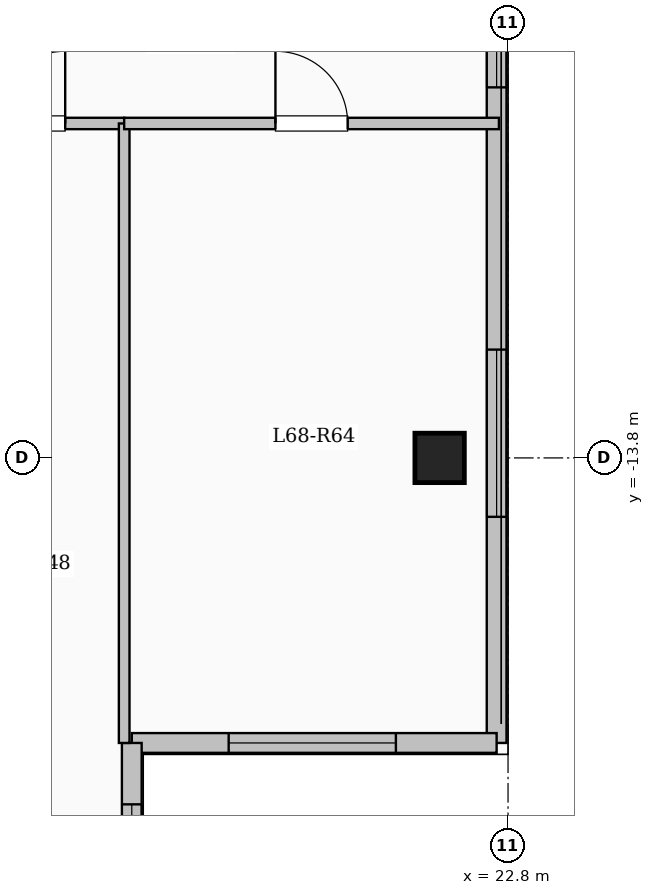
"""IFC4 building model, lengths in metres.
Left out: names, types, materials, properties, quantities, classifications, styles, units other than length and angle.
Written with IfcOpenShell. Run it as: python <this file> out.ifc"""

import sys

from ifc_helpers import new_model, si_unit, direction, frame, frame_2d, origin, origin_2d, place, context, subcontext, project, spatial, rectangle, extrude, element, fill, save


model = new_model("IFC4")
c1 = context("Model", 3, precision=1e-05, world=origin(), true_north=direction((0.0, 1.0)))
c2 = subcontext(c1, "Body", "Model", "MODEL_VIEW")
j1 = project(units=[si_unit("LENGTHUNIT", "METRE"), si_unit("PLANEANGLEUNIT", "RADIAN")], contexts=[c1])
p1 = place(None, origin())
s1 = spatial("IfcSite", under=j1, at=p1, CompositionType="ELEMENT")
p2 = place(p1, origin())
s2 = spatial("IfcBuilding", under=s1, at=p2, CompositionType="ELEMENT")
p3 = place(p2, frame((0.0, 0.0, 251.55)))
s3 = spatial("IfcBuildingStorey", under=s2, at=p3, CompositionType="ELEMENT", Elevation=251.55)
p4 = place(p3, frame((21.9, -13.8, 0.0), z_axis=(0.0, 0.0, 1.0), x_axis=(1.0, 0.0, 0.0)))
e1 = element("IfcColumn", 1, at=p4, inside=s3, PredefinedType="COLUMN", context=c2, shape_type="SweptSolid", body=[
    extrude(rectangle(XDim=0.65, YDim=0.65, at=origin_2d()), origin(), (0.0, 0.0, 1.0), 3.35),
])
p5 = place(p3, frame((22.65, 17.55, 0.0), z_axis=(0.0, 0.0, 1.0), x_axis=(0.0, -1.0, 0.0)))
e2 = element("IfcWall", 2, at=p5, inside=s3, PredefinedType="SOLIDWALL", context=c2, shape_type="SweptSolid", body=[
    extrude(rectangle(XDim=35.1, YDim=0.26, at=frame_2d((17.55, 0.0))), origin(), (0.0, 0.0, 1.0), 3.1),
])
p6 = place(p5, frame((1.525, 0.0, 0.9)))
e3 = element("IfcOpeningElement", 3, at=p6, cuts=e2, PredefinedType="OPENING", context=c2, shape_type="SweptSolid", body=[
    extrude(rectangle(XDim=2.0, YDim=1.7, at=frame_2d((1.0, 0.85))), frame((0.0, 0.14, 0.0), z_axis=(0.0, -1.0, 0.0), x_axis=(1.0, 0.0, 0.0)), (0.0, 0.0, 1.0), 0.28),
])
p7 = place(p5, frame((5.425, 0.0, 0.95)))
e4 = element("IfcOpeningElement", 4, at=p7, cuts=e2, PredefinedType="OPENING", context=c2, shape_type="SweptSolid", body=[
    extrude(rectangle(XDim=1.0, YDim=1.5, at=frame_2d((0.5, 0.75))), frame((0.0, 0.14, 0.0), z_axis=(0.0, -1.0, 0.0), x_axis=(1.0, 0.0, 0.0)), (0.0, 0.0, 1.0), 0.28),
])
p8 = place(p5, frame((14.8, 0.0, 0.9)))
e5 = element("IfcOpeningElement", 5, at=p8, cuts=e2, PredefinedType="OPENING", context=c2, shape_type="SweptSolid", body=[
    extrude(rectangle(XDim=2.0, YDim=1.7, at=frame_2d((1.0, 0.85))), frame((0.0, 0.14, 0.0), z_axis=(0.0, -1.0, 0.0), x_axis=(1.0, 0.0, 0.0)), (0.0, 0.0, 1.0), 0.28),
])
p9 = place(p5, frame((25.275, 0.0, 0.95)))
e6 = element("IfcOpeningElement", 6, at=p9, cuts=e2, PredefinedType="OPENING", context=c2, shape_type="SweptSolid", body=[
    extrude(rectangle(XDim=1.2, YDim=1.5, at=frame_2d((0.6, 0.75))), frame((0.0, 0.14, 0.0), z_axis=(0.0, -1.0, 0.0), x_axis=(1.0, 0.0, 0.0)), (0.0, 0.0, 1.0), 0.28),
])
p10 = place(p5, frame((29.925, 0.0, 0.9)))
e7 = element("IfcOpeningElement", 7, at=p10, cuts=e2, PredefinedType="OPENING", context=c2, shape_type="SweptSolid", body=[
    extrude(rectangle(XDim=2.2, YDim=1.75, at=frame_2d((1.1, 0.875))), frame((0.0, 0.14, 0.0), z_axis=(0.0, -1.0, 0.0), x_axis=(1.0, 0.0, 0.0)), (0.0, 0.0, 1.0), 0.28),
])
p11 = place(p3, frame((22.65, -17.55, 0.0), z_axis=(0.0, 0.0, 1.0), x_axis=(-1.0, 0.0, 0.0)))
e8 = element("IfcWall", 8, at=p11, inside=s3, PredefinedType="SOLIDWALL", context=c2, shape_type="SweptSolid", body=[
    extrude(rectangle(XDim=4.8, YDim=0.26, at=frame_2d((2.4, 0.0))), origin(), (0.0, 0.0, 1.0), 3.1),
])
p12 = place(p11, frame((1.325, 0.0, 0.9)))
e9 = element("IfcOpeningElement", 9, at=p12, cuts=e8, PredefinedType="OPENING", context=c2, shape_type="SweptSolid", body=[
    extrude(rectangle(XDim=2.2, YDim=1.75, at=frame_2d((1.1, 0.875))), frame((0.0, 0.14, 0.0), z_axis=(0.0, -1.0, 0.0), x_axis=(1.0, 0.0, 0.0)), (0.0, 0.0, 1.0), 0.28),
])
p13 = place(p3, frame((17.85, -17.55, 0.0), z_axis=(0.0, 0.0, 1.0), x_axis=(0.0, -1.0, 0.0)))
e10 = element("IfcWall", 10, at=p13, inside=s3, PredefinedType="SOLIDWALL", context=c2, shape_type="SweptSolid", body=[
    extrude(rectangle(XDim=3.3, YDim=0.26, at=frame_2d((1.65, 0.0))), origin(), (0.0, 0.0, 1.0), 3.1),
])
p14 = place(p13, frame((0.808, 0.0, 0.9)))
e11 = element("IfcOpeningElement", 11, at=p14, cuts=e10, PredefinedType="OPENING", context=c2, shape_type="SweptSolid", body=[
    extrude(rectangle(XDim=1.65, YDim=1.6, at=frame_2d((0.825, 0.8))), frame((0.0, 0.14, 0.0), z_axis=(0.0, -1.0, 0.0), x_axis=(1.0, 0.0, 0.0)), (0.0, 0.0, 1.0), 0.28),
])
p15 = place(p3, frame((8.55, -9.4, 0.0), z_axis=(0.0, 0.0, 1.0), x_axis=(1.0, 0.0, 0.0)))
e12 = element("IfcWall", 12, at=p15, inside=s3, PredefinedType="PARTITIONING", context=c2, shape_type="SweptSolid", body=[
    extrude(rectangle(XDim=9.2, YDim=0.15, at=frame_2d((4.6, 0.0))), origin(), (0.0, 0.0, 1.0), 3.1),
])
p16 = place(p15, frame((1.192, 0.0, 0.0)))
e13 = element("IfcOpeningElement", 13, at=p16, cuts=e12, PredefinedType="OPENING", context=c2, shape_type="SweptSolid", body=[
    extrude(rectangle(XDim=0.95, YDim=2.15, at=frame_2d((0.475, 1.075))), frame((0.0, 0.085, 0.0), z_axis=(0.0, -1.0, 0.0), x_axis=(1.0, 0.0, 0.0)), (0.0, 0.0, 1.0), 0.17),
])
p17 = place(p15, frame((4.516, 0.0, 0.0)))
e14 = element("IfcOpeningElement", 14, at=p17, cuts=e12, PredefinedType="OPENING", context=c2, shape_type="SweptSolid", body=[
    extrude(rectangle(XDim=0.95, YDim=2.15, at=frame_2d((0.475, 1.075))), frame((0.0, 0.085, 0.0), z_axis=(0.0, -1.0, 0.0), x_axis=(1.0, 0.0, 0.0)), (0.0, 0.0, 1.0), 0.17),
])
p18 = place(p15, frame((7.474, 0.0, 0.0)))
e15 = element("IfcOpeningElement", 15, at=p18, cuts=e12, PredefinedType="OPENING", context=c2, shape_type="SweptSolid", body=[
    extrude(rectangle(XDim=0.95, YDim=2.15, at=frame_2d((0.475, 1.075))), frame((0.0, 0.085, 0.0), z_axis=(0.0, -1.0, 0.0), x_axis=(1.0, 0.0, 0.0)), (0.0, 0.0, 1.0), 0.17),
])
p19 = place(p3, frame((17.75, -17.55, 0.0), z_axis=(0.0, 0.0, 1.0), x_axis=(0.0, 1.0, 0.0)))
e16 = element("IfcWall", 16, at=p19, inside=s3, PredefinedType="PARTITIONING", context=c2, shape_type="SweptSolid", body=[
    extrude(rectangle(XDim=8.15, YDim=0.14, at=frame_2d((4.075, 0.0))), origin(), (0.0, 0.0, 1.0), 3.1),
])
p20 = place(p3, frame((17.75, -9.4, 0.0), z_axis=(0.0, 0.0, 1.0), x_axis=(1.0, 0.0, 0.0)))
e17 = element("IfcWall", 17, at=p20, inside=s3, PredefinedType="PARTITIONING", context=c2, shape_type="SweptSolid", body=[
    extrude(rectangle(XDim=4.93, YDim=0.15, at=frame_2d((2.465, 0.0))), origin(), (0.0, 0.0, 1.0), 3.1),
])
p21 = place(p20, frame((1.99, 0.0, 0.0)))
e18 = element("IfcOpeningElement", 18, at=p21, cuts=e17, PredefinedType="OPENING", context=c2, shape_type="SweptSolid", body=[
    extrude(rectangle(XDim=0.95, YDim=2.15, at=frame_2d((0.475, 1.075))), frame((0.0, 0.085, 0.0), z_axis=(0.0, -1.0, 0.0), x_axis=(1.0, 0.0, 0.0)), (0.0, 0.0, 1.0), 0.17),
])
p22 = place(p9, origin())
e19 = element("IfcWindow", 19, at=p22, inside=s3, PartitioningType="SINGLE_PANEL", PredefinedType="WINDOW", context=c2, shape_type="SweptSolid", body=[
    extrude(rectangle(XDim=1.2, YDim=1.5, at=frame_2d((0.6, 0.75))), frame((0.0, 0.03, 0.0), z_axis=(0.0, -1.0, 0.0), x_axis=(1.0, 0.0, 0.0)), (0.0, 0.0, 1.0), 0.06),
])
fill(e6, e19)
p23 = place(p10, origin())
e20 = element("IfcWindow", 20, at=p23, inside=s3, PartitioningType="SINGLE_PANEL", PredefinedType="WINDOW", context=c2, shape_type="SweptSolid", body=[
    extrude(rectangle(XDim=2.2, YDim=1.75, at=frame_2d((1.1, 0.875))), frame((0.0, 0.03, 0.0), z_axis=(0.0, -1.0, 0.0), x_axis=(1.0, 0.0, 0.0)), (0.0, 0.0, 1.0), 0.06),
])
fill(e7, e20)
p24 = place(p12, origin())
e21 = element("IfcWindow", 21, at=p24, inside=s3, PartitioningType="SINGLE_PANEL", PredefinedType="WINDOW", context=c2, shape_type="SweptSolid", body=[
    extrude(rectangle(XDim=2.2, YDim=1.75, at=frame_2d((1.1, 0.875))), frame((0.0, 0.03, 0.0), z_axis=(0.0, -1.0, 0.0), x_axis=(1.0, 0.0, 0.0)), (0.0, 0.0, 1.0), 0.06),
])
fill(e9, e21)
p25 = place(p14, origin())
e22 = element("IfcWindow", 22, at=p25, inside=s3, PartitioningType="SINGLE_PANEL", PredefinedType="WINDOW", context=c2, shape_type="SweptSolid", body=[
    extrude(rectangle(XDim=1.65, YDim=1.6, at=frame_2d((0.825, 0.8))), frame((0.0, 0.03, 0.0), z_axis=(0.0, -1.0, 0.0), x_axis=(1.0, 0.0, 0.0)), (0.0, 0.0, 1.0), 0.06),
])
fill(e11, e22)
p26 = place(p18, origin())
e23 = element("IfcDoor", 23, at=p26, inside=s3, OperationType="SINGLE_SWING_RIGHT", PredefinedType="DOOR", context=c2, shape_type="SweptSolid", body=[
    extrude(rectangle(XDim=0.95, YDim=2.15, at=frame_2d((0.475, 1.075))), frame((0.0, 0.025, 0.0), z_axis=(0.0, -1.0, 0.0), x_axis=(1.0, 0.0, 0.0)), (0.0, 0.0, 1.0), 0.05),
])
fill(e15, e23)
p27 = place(p21, origin())
e24 = element("IfcDoor", 24, at=p27, inside=s3, OperationType="SINGLE_SWING_LEFT", PredefinedType="DOOR", context=c2, shape_type="SweptSolid", body=[
    extrude(rectangle(XDim=0.95, YDim=2.15, at=frame_2d((0.475, 1.075))), frame((0.0, 0.025, 0.0), z_axis=(0.0, -1.0, 0.0), x_axis=(1.0, 0.0, 0.0)), (0.0, 0.0, 1.0), 0.05),
])
fill(e18, e24)
save(model, sys.argv[1])
